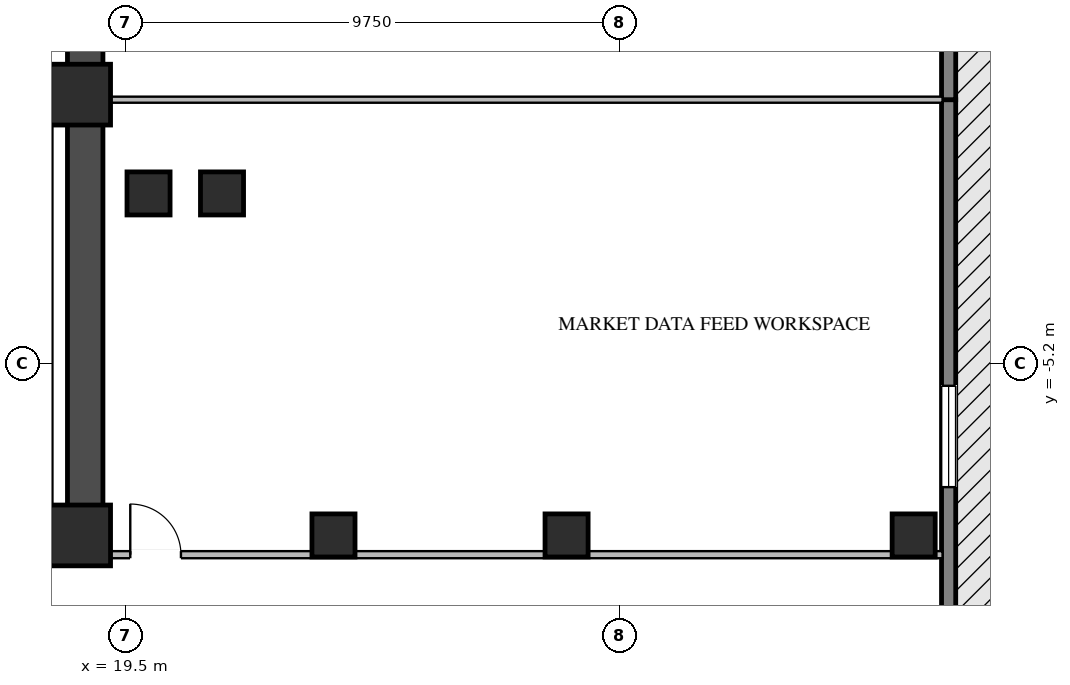
"""IFC4 building model, lengths in metres.
Left out: names, types, materials, properties, quantities, classifications, styles, units other than length and angle.
Written with IfcOpenShell. Run it as: python <this file> out.ifc"""

import sys

from ifc_helpers import new_model, si_unit, direction, frame, frame_2d, origin, origin_2d, place, context, subcontext, project, spatial, rectangle, i_section, extrude, element, fill, save


model = new_model("IFC4")
c1 = context("Model", 3, precision=1e-05, world=origin(), true_north=direction((0.0, 1.0)))
c2 = subcontext(c1, "Body", "Model", "MODEL_VIEW")
j1 = project(units=[si_unit("LENGTHUNIT", "METRE"), si_unit("PLANEANGLEUNIT", "RADIAN")], contexts=[c1])
p1 = place(None, origin())
s1 = spatial("IfcSite", under=j1, at=p1, CompositionType="ELEMENT")
p2 = place(p1, origin())
s2 = spatial("IfcBuilding", under=s1, at=p2, CompositionType="ELEMENT")
p3 = place(p2, frame((0.0, 0.0, 27.0)))
s3 = spatial("IfcBuildingStorey", under=s2, at=p3, CompositionType="ELEMENT", Elevation=27.0)
p4 = place(p3, frame((8.8, -8.7, 0.0), z_axis=(0.0, 0.0, 1.0), x_axis=(1.0, 0.0, 0.0)))
e1 = element("IfcWall", 1, at=p4, inside=s3, PredefinedType="SHEAR", context=c2, shape_type="SweptSolid", body=[
    extrude(rectangle(XDim=10.25, YDim=0.7, at=frame_2d((5.125, 0.0))), origin(), (0.0, 0.0, 1.0), 4.02),
])
p5 = place(p3, frame((18.7, -8.35, 0.0), z_axis=(0.0, 0.0, 1.0), x_axis=(0.0, 1.0, 0.0)))
e2 = element("IfcWall", 2, at=p5, inside=s3, PredefinedType="SHEAR", context=c2, shape_type="SweptSolid", body=[
    extrude(rectangle(XDim=16.7, YDim=0.7, at=frame_2d((8.35, 0.0))), origin(), (0.0, 0.0, 1.0), 4.02),
])
for number, where, z_axis, x_axis in (
    (3, (18.6, -8.6, 0.0), (0.0, 0.0, 1.0), (1.0, 0.0, 0.0)),
    (4, (18.6, 0.1, 0.0), (0.0, 0.0, 1.0), (1.0, 0.0, 0.0)),
):
    element("IfcColumn", number, at=place(p3, frame(where, z_axis=z_axis, x_axis=x_axis)), inside=s3, PredefinedType="COLUMN", context=c2, shape_type="SweptSolid", body=[
        extrude(rectangle(XDim=1.2, YDim=1.2, at=origin_2d()), origin(), (0.0, 0.0, 1.0), 4.2),
    ])
for number, where, z_axis, x_axis in (
    (5, (19.95, -1.85, 0.0), (0.0, 0.0, 1.0), (1.0, 0.0, 0.0)),
    (6, (21.4, -1.85, 0.0), (0.0, 0.0, 1.0), (1.0, 0.0, 0.0)),
    (7, (23.6, -8.6, 0.0), (0.0, 0.0, 1.0), (1.0, 0.0, 0.0)),
    (8, (28.2, -8.6, 0.0), (0.0, 0.0, 1.0), (1.0, 0.0, 0.0)),
    (9, (35.05, -8.6, 0.0), (0.0, 0.0, 1.0), (1.0, 0.0, 0.0)),
):
    element("IfcColumn", number, at=place(p3, frame(where, z_axis=z_axis, x_axis=x_axis)), inside=s3, PredefinedType="COLUMN", context=c2, shape_type="SweptSolid", body=[
        extrude(i_section(OverallWidth=0.85, OverallDepth=0.85, WebThickness=0.032, FlangeThickness=0.048, at=origin_2d()), origin(), (0.0, 0.0, 1.0), 4.2),
    ])
p6 = place(p3, frame((35.74, 0.0, 0.0), z_axis=(0.0, 0.0, 1.0), x_axis=(0.0, -1.0, 0.0)))
e10 = element("IfcWall", 10, at=p6, inside=s3, PredefinedType="STANDARD", context=c2, shape_type="SweptSolid", body=[
    extrude(rectangle(XDim=19.94, YDim=0.28, at=frame_2d((9.97, 0.0))), origin(), (0.0, 0.0, 1.0), 4.0),
])
p7 = place(p6, frame((5.647, 0.0, 0.76)))
e11 = element("IfcOpeningElement", 11, at=p7, cuts=e10, PredefinedType="OPENING", context=c2, shape_type="SweptSolid", body=[
    extrude(rectangle(XDim=2.0, YDim=2.05, at=frame_2d((1.0, 1.025))), frame((0.0, 0.15, 0.0), z_axis=(0.0, -1.0, 0.0), x_axis=(1.0, 0.0, 0.0)), (0.0, 0.0, 1.0), 0.3),
])
p8 = place(p6, frame((11.743, 0.0, 0.76)))
e12 = element("IfcOpeningElement", 12, at=p8, cuts=e10, PredefinedType="OPENING", context=c2, shape_type="SweptSolid", body=[
    extrude(rectangle(XDim=2.0, YDim=2.05, at=frame_2d((1.0, 1.025))), frame((0.0, 0.15, 0.0), z_axis=(0.0, -1.0, 0.0), x_axis=(1.0, 0.0, 0.0)), (0.0, 0.0, 1.0), 0.3),
])
p9 = place(p3, frame((35.74, 19.94, 0.0), z_axis=(0.0, 0.0, 1.0), x_axis=(0.0, -1.0, 0.0)))
e13 = element("IfcWall", 13, at=p9, inside=s3, PredefinedType="STANDARD", context=c2, shape_type="SweptSolid", body=[
    extrude(rectangle(XDim=19.94, YDim=0.28, at=frame_2d((9.97, 0.0))), origin(), (0.0, 0.0, 1.0), 4.0),
])
p10 = place(p9, frame((6.197, 0.0, 0.76)))
e14 = element("IfcOpeningElement", 14, at=p10, cuts=e13, PredefinedType="OPENING", context=c2, shape_type="SweptSolid", body=[
    extrude(rectangle(XDim=2.0, YDim=2.05, at=frame_2d((1.0, 1.025))), frame((0.0, 0.15, 0.0), z_axis=(0.0, -1.0, 0.0), x_axis=(1.0, 0.0, 0.0)), (0.0, 0.0, 1.0), 0.3),
])
p11 = place(p9, frame((12.293, 0.0, 0.76)))
e15 = element("IfcOpeningElement", 15, at=p11, cuts=e13, PredefinedType="OPENING", context=c2, shape_type="SweptSolid", body=[
    extrude(rectangle(XDim=2.0, YDim=2.05, at=frame_2d((1.0, 1.025))), frame((0.0, 0.15, 0.0), z_axis=(0.0, -1.0, 0.0), x_axis=(1.0, 0.0, 0.0)), (0.0, 0.0, 1.0), 0.3),
])
p12 = place(p3, frame((19.05, -8.98, 0.0), z_axis=(0.0, 0.0, 1.0), x_axis=(1.0, 0.0, 0.0)))
e16 = element("IfcWall", 16, at=p12, inside=s3, PredefinedType="STANDARD", context=c2, shape_type="SweptSolid", body=[
    extrude(rectangle(XDim=16.57, YDim=0.14, at=frame_2d((8.285, 0.0))), origin(), (0.0, 0.0, 1.0), 4.0),
])
p13 = place(p12, frame((0.54, 0.0, 0.0)))
e17 = element("IfcOpeningElement", 17, at=p13, cuts=e16, PredefinedType="OPENING", context=c2, shape_type="SweptSolid", body=[
    extrude(rectangle(XDim=1.0, YDim=2.08, at=frame_2d((0.5, 1.04))), frame((0.0, 0.08, 0.0), z_axis=(0.0, -1.0, 0.0), x_axis=(1.0, 0.0, 0.0)), (0.0, 0.0, 1.0), 0.16),
])
p14 = place(p3, frame((19.05, 0.0, 0.0), z_axis=(0.0, 0.0, 1.0), x_axis=(1.0, 0.0, 0.0)))
e18 = element("IfcWall", 18, at=p14, inside=s3, PredefinedType="STANDARD", context=c2, shape_type="SweptSolid", body=[
    extrude(rectangle(XDim=16.57, YDim=0.12, at=frame_2d((8.285, 0.0))), origin(), (0.0, 0.0, 1.0), 3.495),
])
p15 = place(p7, origin())
e19 = element("IfcWindow", 19, at=p15, inside=s3, PartitioningType="DOUBLE_PANEL_VERTICAL", PredefinedType="WINDOW", context=c2, shape_type="SweptSolid", body=[
    extrude(rectangle(XDim=2.0, YDim=2.05, at=frame_2d((1.0, 1.025))), frame((0.0, 0.03, 0.0), z_axis=(0.0, -1.0, 0.0), x_axis=(1.0, 0.0, 0.0)), (0.0, 0.0, 1.0), 0.06),
])
fill(e11, e19)
p16 = place(p13, origin())
e20 = element("IfcDoor", 20, at=p16, inside=s3, OperationType="SINGLE_SWING_LEFT", PredefinedType="DOOR", context=c2, shape_type="SweptSolid", body=[
    extrude(rectangle(XDim=1.0, YDim=2.08, at=frame_2d((0.5, 1.04))), frame((0.0, 0.025, 0.0), z_axis=(0.0, -1.0, 0.0), x_axis=(1.0, 0.0, 0.0)), (0.0, 0.0, 1.0), 0.05),
])
fill(e17, e20)
save(model, sys.argv[1])
